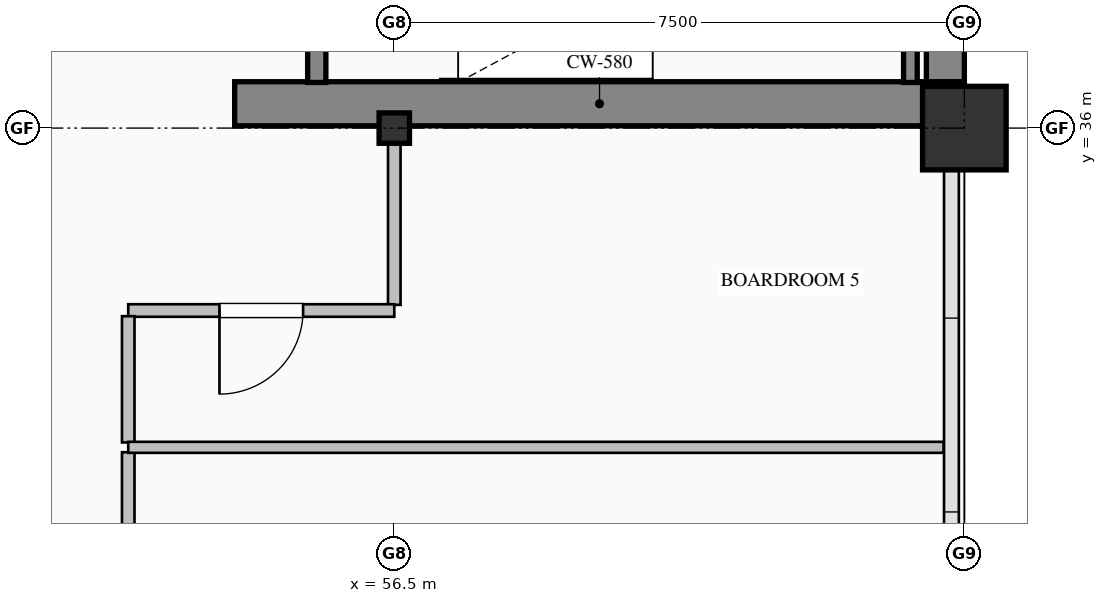
"""IFC4 building model, lengths in metres.
Left out: names, types, materials, properties, quantities, classifications, styles, units other than length and angle.
Written with IfcOpenShell. Run it as: python <this file> out.ifc"""

import sys

from ifc_helpers import new_model, si_unit, direction, frame, frame_2d, origin, origin_2d, place, context, subcontext, project, spatial, rectangle, hollow_rectangle, i_section, extrude, element, fill, save


model = new_model("IFC4")
c1 = context("Model", 3, precision=1e-05, world=origin(), true_north=direction((0.0, 1.0)))
c2 = subcontext(c1, "Body", "Model", "MODEL_VIEW")
j1 = project(units=[si_unit("LENGTHUNIT", "METRE"), si_unit("PLANEANGLEUNIT", "RADIAN")], contexts=[c1])
p1 = place(None, origin())
s1 = spatial("IfcSite", under=j1, at=p1, CompositionType="ELEMENT")
p2 = place(p1, origin())
s2 = spatial("IfcBuilding", under=s1, at=p2, CompositionType="ELEMENT")
p3 = place(p2, frame((0.0, 0.0, 119.0)))
s3 = spatial("IfcBuildingStorey", under=s2, at=p3, CompositionType="ELEMENT", Elevation=119.0)
p4 = place(p3, frame((63.75, 36.32, 0.0), z_axis=(0.0, 0.0, 1.0), x_axis=(0.0, 1.0, 0.0)))
e1 = element("IfcWall", 1, at=p4, inside=s3, PredefinedType="SHEAR", context=c2, shape_type="SweptSolid", body=[
    extrude(rectangle(XDim=15.18, YDim=0.5, at=frame_2d((7.59, 0.0))), origin(), (0.0, 0.0, 1.0), 3.765),
])
p5 = place(p3, frame((54.4, 36.32, 0.0), z_axis=(0.0, 0.0, 1.0), x_axis=(1.0, 0.0, 0.0)))
e2 = element("IfcWall", 2, at=p5, inside=s3, PredefinedType="SHEAR", context=c2, shape_type="SweptSolid", body=[
    extrude(rectangle(XDim=9.6, YDim=0.58, at=frame_2d((4.8, 0.0))), origin(), (0.0, 0.0, 1.0), 4.0),
])
p6 = place(p3, frame((56.5, 36.0, 0.0), z_axis=(0.0, 0.0, 1.0), x_axis=(1.0, 0.0, 0.0)))
e3 = element("IfcColumn", 3, at=p6, inside=s3, PredefinedType="COLUMN", context=c2, shape_type="SweptSolid", body=[
    extrude(i_section(OverallWidth=0.4, OverallDepth=0.4, WebThickness=0.013, FlangeThickness=0.021, FilletRadius=0.022, at=origin_2d()), origin(), (0.0, 0.0, 1.0), 4.0),
])
p7 = place(p3, frame((64.0, 36.0, 0.0), z_axis=(0.0, 0.0, 1.0), x_axis=(1.0, 0.0, 0.0)))
e4 = element("IfcColumn", 4, at=p7, inside=s3, PredefinedType="COLUMN", context=c2, shape_type="SweptSolid", body=[
    extrude(hollow_rectangle(XDim=1.1, YDim=1.1, WallThickness=0.04, at=origin_2d()), origin(), (0.0, 0.0, 1.0), 4.0),
])
p8 = place(p3, frame((55.48, 39.75, 0.0), z_axis=(0.0, 0.0, 1.0), x_axis=(0.0, -1.0, 0.0)))
e5 = element("IfcWall", 5, at=p8, inside=s3, PredefinedType="SOLIDWALL", context=c2, shape_type="SweptSolid", body=[
    extrude(rectangle(XDim=3.15, YDim=0.24, at=frame_2d((1.575, 0.0))), origin(), (0.0, 0.0, 1.0), 4.0),
])
p9 = place(p8, frame((1.0, 0.0, 0.0)))
e6 = element("IfcOpeningElement", 6, at=p9, cuts=e5, PredefinedType="OPENING", context=c2, shape_type="SweptSolid", body=[
    extrude(rectangle(XDim=1.15, YDim=2.2, at=frame_2d((0.575, 1.1))), frame((0.0, 0.13, 0.0), z_axis=(0.0, -1.0, 0.0), x_axis=(1.0, 0.0, 0.0)), (0.0, 0.0, 1.0), 0.26),
])
p10 = place(p3, frame((63.29, 36.6, 0.0), z_axis=(0.0, 0.0, 1.0), x_axis=(0.0, 1.0, 0.0)))
e7 = element("IfcWall", 7, at=p10, inside=s3, PredefinedType="SOLIDWALL", context=c2, shape_type="SweptSolid", body=[
    extrude(rectangle(XDim=3.15, YDim=0.18, at=frame_2d((1.575, 0.0))), origin(), (0.0, 0.0, 1.0), 4.0),
])
p11 = place(p3, frame((56.5, 36.0, 0.0), z_axis=(0.0, 0.0, 1.0), x_axis=(0.0, -1.0, 0.0)))
e8 = element("IfcWall", 8, at=p11, inside=s3, PredefinedType="PARTITIONING", context=c2, shape_type="SweptSolid", body=[
    extrude(rectangle(XDim=2.325, YDim=0.165, at=frame_2d((1.163, 0.0))), origin(), (0.0, 0.0, 1.0), 3.157),
])
p12 = place(p3, frame((56.5, 33.6, 0.0), z_axis=(0.0, 0.0, 1.0), x_axis=(-1.0, 0.0, 0.0)))
e9 = element("IfcWall", 9, at=p12, inside=s3, PredefinedType="PARTITIONING", context=c2, shape_type="SweptSolid", body=[
    extrude(rectangle(XDim=3.5, YDim=0.165, at=frame_2d((1.75, 0.0))), origin(), (0.0, 0.0, 1.0), 3.765),
])
p13 = place(p12, frame((1.2, 0.0, 0.0)))
e10 = element("IfcOpeningElement", 10, at=p13, cuts=e9, PredefinedType="OPENING", context=c2, shape_type="SweptSolid", body=[
    extrude(rectangle(XDim=1.1, YDim=2.2, at=frame_2d((0.55, 1.1))), frame((0.0, 0.093, 0.0), z_axis=(0.0, -1.0, 0.0), x_axis=(1.0, 0.0, 0.0)), (0.0, 0.0, 1.0), 0.185),
])
p14 = place(p3, frame((53.0, 31.736, 0.0), z_axis=(0.0, 0.0, 1.0), x_axis=(0.0, -1.0, 0.0)))
e11 = element("IfcWall", 11, at=p14, inside=s3, PredefinedType="PARTITIONING", context=c2, shape_type="SweptSolid", body=[
    extrude(rectangle(XDim=3.671, YDim=0.165, at=frame_2d((1.835, 0.0))), origin(), (0.0, 0.0, 1.0), 3.765),
])
p15 = place(p14, frame((1.335, 0.0, 0.0)))
e12 = element("IfcOpeningElement", 12, at=p15, cuts=e11, PredefinedType="OPENING", context=c2, shape_type="SweptSolid", body=[
    extrude(rectangle(XDim=1.0, YDim=2.15, at=frame_2d((0.5, 1.075))), frame((0.0, 0.093, 0.0), z_axis=(0.0, -1.0, 0.0), x_axis=(1.0, 0.0, 0.0)), (0.0, 0.0, 1.0), 0.185),
])
p16 = place(p3, frame((53.0, 33.525, 0.0), z_axis=(0.0, 0.0, 1.0), x_axis=(0.0, -1.0, 0.0)))
e13 = element("IfcWall", 13, at=p16, inside=s3, PredefinedType="PARTITIONING", context=c2, shape_type="SweptSolid", body=[
    extrude(rectangle(XDim=1.661, YDim=0.165, at=frame_2d((0.831, 0.0))), origin(), (0.0, 0.0, 1.0), 3.765),
])
p17 = place(p3, frame((53.0, 31.8, 0.0), z_axis=(0.0, 0.0, 1.0), x_axis=(1.0, 0.0, 0.0)))
e14 = element("IfcWall", 14, at=p17, inside=s3, PredefinedType="PARTITIONING", context=c2, shape_type="SweptSolid", body=[
    extrude(rectangle(XDim=10.728, YDim=0.145, at=frame_2d((5.364, 0.0))), origin(), (0.0, 0.0, 1.0), 3.765),
])
p18 = place(p13, origin())
e15 = element("IfcDoor", 15, at=p18, inside=s3, OperationType="SINGLE_SWING_RIGHT", PredefinedType="DOOR", context=c2, shape_type="SweptSolid", body=[
    extrude(rectangle(XDim=1.1, YDim=2.2, at=frame_2d((0.55, 1.1))), frame((0.0, 0.025, 0.0), z_axis=(0.0, -1.0, 0.0), x_axis=(1.0, 0.0, 0.0)), (0.0, 0.0, 1.0), 0.05),
])
fill(e10, e15)
save(model, sys.argv[1])
